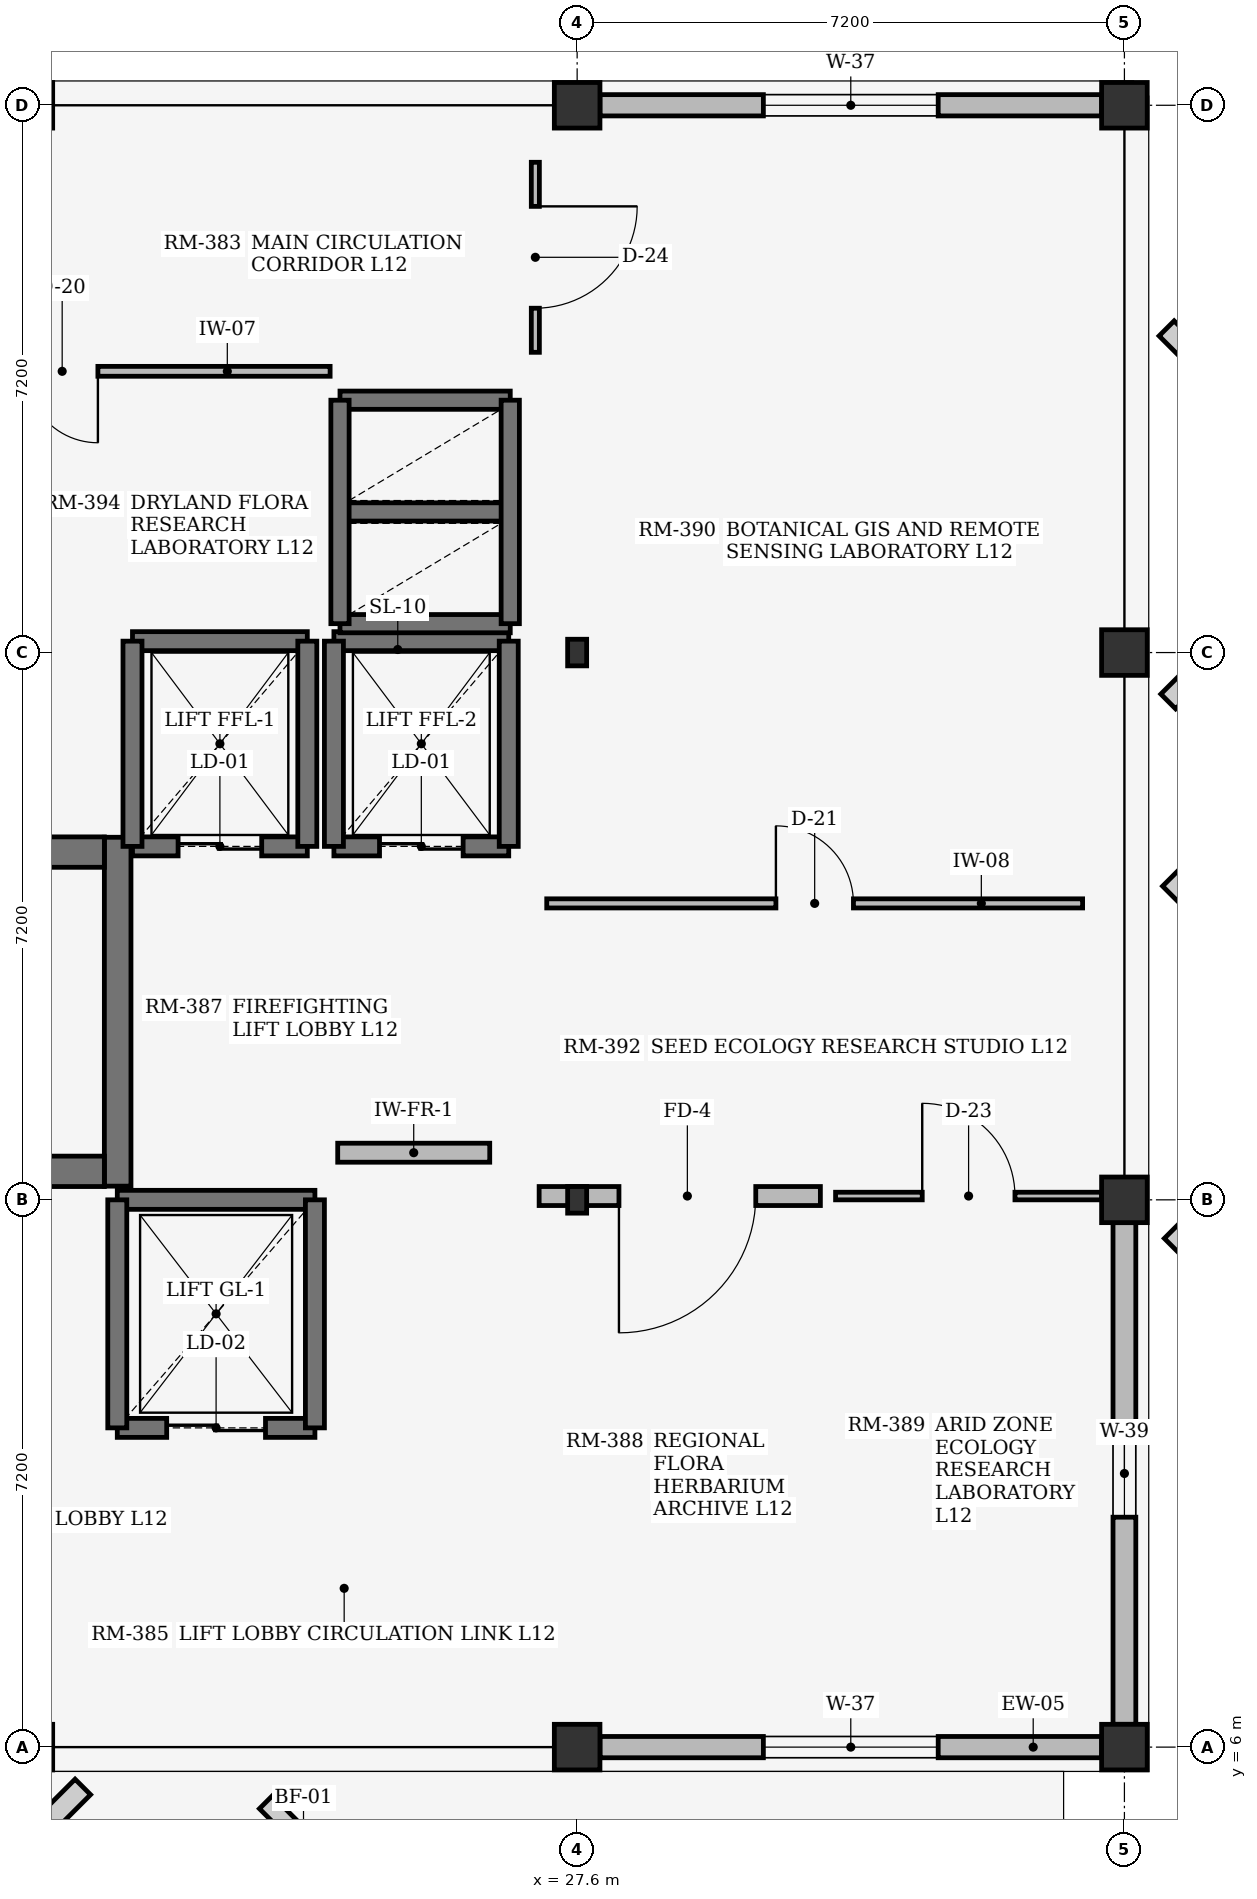
"""IFC4 building model, lengths in metres.
Left out: names, types, materials, properties, quantities, classifications, styles, units other than length and angle.
Written with IfcOpenShell. Run it as: python <this file> out.ifc"""

import sys

from ifc_helpers import new_model, si_unit, direction, frame, frame_2d, origin, origin_2d, place, context, subcontext, project, spatial, rectangle, i_section, extrude, element, fill, save


model = new_model("IFC4")
c1 = context("Model", 3, precision=1e-05, world=origin(), true_north=direction((0.0, 1.0)))
c2 = subcontext(c1, "Body", "Model", "MODEL_VIEW")
j1 = project(units=[si_unit("LENGTHUNIT", "METRE"), si_unit("PLANEANGLEUNIT", "RADIAN")], contexts=[c1])
p1 = place(None, origin())
s1 = spatial("IfcSite", under=j1, at=p1, CompositionType="ELEMENT")
p2 = place(p1, origin())
s2 = spatial("IfcBuilding", under=s1, at=p2, CompositionType="ELEMENT")
p3 = place(p2, frame((0.0, 0.0, 48.3)))
s3 = spatial("IfcBuildingStorey", under=s2, at=p3, CompositionType="ELEMENT", Elevation=48.3)
p4 = place(p3, frame((27.6, 6.0, 0.0), z_axis=(0.0, 0.0, 1.0), x_axis=(1.0, 0.0, 0.0)))
e1 = element("IfcColumn", 1, at=p4, inside=s3, PredefinedType="COLUMN", context=c2, shape_type="SweptSolid", body=[
    extrude(rectangle(XDim=0.6, YDim=0.6, at=origin_2d()), origin(), (0.0, 0.0, 1.0), 3.68),
])
for number, where, z_axis, x_axis in (
    (2, (27.6, 13.2, 0.0), (0.0, 0.0, 1.0), (1.0, 0.0, 0.0)),
    (3, (27.6, 20.4, 0.0), (0.0, 0.0, 1.0), (1.0, 0.0, 0.0)),
):
    element("IfcColumn", number, at=place(p3, frame(where, z_axis=z_axis, x_axis=x_axis)), inside=s3, PredefinedType="COLUMN", context=c2, shape_type="SweptSolid", body=[
        extrude(i_section(OverallWidth=0.25, OverallDepth=0.35, WebThickness=0.01, FlangeThickness=0.012, at=origin_2d()), origin(), (0.0, 0.0, 1.0), 3.68),
    ])
for number, where, z_axis, x_axis in (
    (4, (27.6, 27.6, 0.0), (0.0, 0.0, 1.0), (1.0, 0.0, 0.0)),
    (5, (34.8, 6.0, 0.0), (0.0, 0.0, 1.0), (1.0, 0.0, 0.0)),
    (6, (34.8, 13.2, 0.0), (0.0, 0.0, 1.0), (1.0, 0.0, 0.0)),
    (7, (34.8, 20.4, 0.0), (0.0, 0.0, 1.0), (1.0, 0.0, 0.0)),
    (8, (34.8, 27.6, 0.0), (0.0, 0.0, 1.0), (1.0, 0.0, 0.0)),
):
    element("IfcColumn", number, at=place(p3, frame(where, z_axis=z_axis, x_axis=x_axis)), inside=s3, PredefinedType="COLUMN", context=c2, shape_type="SweptSolid", body=[
        extrude(rectangle(XDim=0.6, YDim=0.6, at=origin_2d()), origin(), (0.0, 0.0, 1.0), 3.68),
    ])
p5 = place(p3, frame((27.9, 6.0, 0.0), z_axis=(0.0, 0.0, 1.0), x_axis=(1.0, 0.0, 0.0)))
e9 = element("IfcWall", 9, at=p5, inside=s3, PredefinedType="STANDARD", context=c2, shape_type="SweptSolid", body=[
    extrude(rectangle(XDim=6.6, YDim=0.28, at=frame_2d((3.3, 0.0))), origin(), (0.0, 0.0, 1.0), 3.26),
])
p6 = place(p5, frame((2.15, 0.0, 0.75)))
e10 = element("IfcOpeningElement", 10, at=p6, cuts=e9, PredefinedType="OPENING", context=c2, shape_type="SweptSolid", body=[
    extrude(rectangle(XDim=2.3, YDim=1.35, at=frame_2d((1.15, 0.675))), frame((0.0, 0.15, 0.0), z_axis=(0.0, -1.0, 0.0), x_axis=(1.0, 0.0, 0.0)), (0.0, 0.0, 1.0), 0.3),
])
p7 = place(p3, frame((27.9, 27.6, 0.0), z_axis=(0.0, 0.0, 1.0), x_axis=(1.0, 0.0, 0.0)))
e11 = element("IfcWall", 11, at=p7, inside=s3, PredefinedType="STANDARD", context=c2, shape_type="SweptSolid", body=[
    extrude(rectangle(XDim=6.6, YDim=0.28, at=frame_2d((3.3, 0.0))), origin(), (0.0, 0.0, 1.0), 3.26),
])
p8 = place(p7, frame((2.15, 0.0, 0.75)))
e12 = element("IfcOpeningElement", 12, at=p8, cuts=e11, PredefinedType="OPENING", context=c2, shape_type="SweptSolid", body=[
    extrude(rectangle(XDim=2.3, YDim=1.35, at=frame_2d((1.15, 0.675))), frame((0.0, 0.15, 0.0), z_axis=(0.0, -1.0, 0.0), x_axis=(1.0, 0.0, 0.0)), (0.0, 0.0, 1.0), 0.3),
])
p9 = place(p3, frame((34.8, 6.3, 0.0), z_axis=(0.0, 0.0, 1.0), x_axis=(0.0, 1.0, 0.0)))
e13 = element("IfcWall", 13, at=p9, inside=s3, PredefinedType="STANDARD", context=c2, shape_type="SweptSolid", body=[
    extrude(rectangle(XDim=6.6, YDim=0.3, at=frame_2d((3.3, 0.0))), origin(), (0.0, 0.0, 1.0), 3.26),
])
p10 = place(p9, frame((2.725, 0.0, 0.75)))
e14 = element("IfcOpeningElement", 14, at=p10, cuts=e13, PredefinedType="OPENING", context=c2, shape_type="SweptSolid", body=[
    extrude(rectangle(XDim=1.15, YDim=1.5, at=frame_2d((0.575, 0.75))), frame((0.0, 0.16, 0.0), z_axis=(0.0, -1.0, 0.0), x_axis=(1.0, 0.0, 0.0)), (0.0, 0.0, 1.0), 0.32),
])
p11 = place(p3, frame((21.555, 13.38, 0.0), z_axis=(0.0, 0.0, 1.0), x_axis=(0.0, 1.0, 0.0)))
e15 = element("IfcWall", 15, at=p11, inside=s3, PredefinedType="SHEAR", context=c2, shape_type="SweptSolid", body=[
    extrude(rectangle(XDim=4.59, YDim=0.35, at=frame_2d((2.295, 0.0))), origin(), (0.0, 0.0, 1.0), 3.68),
])
for number, where, z_axis, x_axis in (
    (16, (13.4, 13.575, 0.0), (0.0, 0.0, 1.0), (1.0, 0.0, 0.0)),
    (17, (13.4, 17.775, 0.0), (0.0, 0.0, 1.0), (1.0, 0.0, 0.0)),
):
    element("IfcWall", number, at=place(p3, frame(where, z_axis=z_axis, x_axis=x_axis)), inside=s3, PredefinedType="SHEAR", context=c2, shape_type="SweptSolid", body=[
        extrude(rectangle(XDim=7.98, YDim=0.4, at=frame_2d((3.99, 0.0))), origin(), (0.0, 0.0, 1.0), 3.68),
    ])
p12 = place(p3, frame((21.75, 17.85, 0.0), z_axis=(0.0, 0.0, 1.0), x_axis=(1.0, 0.0, 0.0)))
e18 = element("IfcWall", 18, at=p12, inside=s3, PredefinedType="SHEAR", context=c2, shape_type="SweptSolid", body=[
    extrude(rectangle(XDim=2.3, YDim=0.25, at=frame_2d((1.15, 0.0))), origin(), (0.0, 0.0, 1.0), 3.68),
])
p13 = place(p12, frame((0.6, 0.0, 0.0)))
e19 = element("IfcOpeningElement", 19, at=p13, cuts=e18, PredefinedType="OPENING", context=c2, shape_type="SweptSolid", body=[
    extrude(rectangle(XDim=1.1, YDim=2.2, at=frame_2d((0.55, 1.1))), frame((0.0, 0.135, 0.0), z_axis=(0.0, -1.0, 0.0), x_axis=(1.0, 0.0, 0.0)), (0.0, 0.0, 1.0), 0.27),
])
p14 = place(p3, frame((21.75, 20.55, 0.0), z_axis=(0.0, 0.0, 1.0), x_axis=(1.0, 0.0, 0.0)))
e20 = element("IfcWall", 20, at=p14, inside=s3, PredefinedType="SHEAR", context=c2, shape_type="SweptSolid", body=[
    extrude(rectangle(XDim=2.3, YDim=0.25, at=frame_2d((1.15, 0.0))), origin(), (0.0, 0.0, 1.0), 3.68),
])
for number, where, z_axis, x_axis in (
    (21, (21.75, 17.85, 0.0), (0.0, 0.0, 1.0), (0.0, 1.0, 0.0)),
    (22, (24.05, 17.85, 0.0), (0.0, 0.0, 1.0), (0.0, 1.0, 0.0)),
):
    element("IfcWall", number, at=place(p3, frame(where, z_axis=z_axis, x_axis=x_axis)), inside=s3, PredefinedType="SHEAR", context=c2, shape_type="SweptSolid", body=[
        extrude(rectangle(XDim=2.7, YDim=0.25, at=frame_2d((1.35, 0.0))), origin(), (0.0, 0.0, 1.0), 3.68),
    ])
p15 = place(p3, frame((24.4, 17.85, 0.0), z_axis=(0.0, 0.0, 1.0), x_axis=(1.0, 0.0, 0.0)))
e23 = element("IfcWall", 23, at=p15, inside=s3, PredefinedType="SHEAR", context=c2, shape_type="SweptSolid", body=[
    extrude(rectangle(XDim=2.3, YDim=0.25, at=frame_2d((1.15, 0.0))), origin(), (0.0, 0.0, 1.0), 3.68),
])
p16 = place(p15, frame((0.6, 0.0, 0.0)))
e24 = element("IfcOpeningElement", 24, at=p16, cuts=e23, PredefinedType="OPENING", context=c2, shape_type="SweptSolid", body=[
    extrude(rectangle(XDim=1.1, YDim=2.2, at=frame_2d((0.55, 1.1))), frame((0.0, 0.135, 0.0), z_axis=(0.0, -1.0, 0.0), x_axis=(1.0, 0.0, 0.0)), (0.0, 0.0, 1.0), 0.27),
])
p17 = place(p3, frame((24.4, 20.55, 0.0), z_axis=(0.0, 0.0, 1.0), x_axis=(1.0, 0.0, 0.0)))
e25 = element("IfcWall", 25, at=p17, inside=s3, PredefinedType="SHEAR", context=c2, shape_type="SweptSolid", body=[
    extrude(rectangle(XDim=2.3, YDim=0.25, at=frame_2d((1.15, 0.0))), origin(), (0.0, 0.0, 1.0), 3.68),
])
for number, where, z_axis, x_axis in (
    (26, (24.4, 17.85, 0.0), (0.0, 0.0, 1.0), (0.0, 1.0, 0.0)),
    (27, (26.7, 17.85, 0.0), (0.0, 0.0, 1.0), (0.0, 1.0, 0.0)),
):
    element("IfcWall", number, at=place(p3, frame(where, z_axis=z_axis, x_axis=x_axis)), inside=s3, PredefinedType="SHEAR", context=c2, shape_type="SweptSolid", body=[
        extrude(rectangle(XDim=2.7, YDim=0.25, at=frame_2d((1.35, 0.0))), origin(), (0.0, 0.0, 1.0), 3.68),
    ])
p18 = place(p3, frame((21.55, 10.2, 0.0), z_axis=(0.0, 0.0, 1.0), x_axis=(1.0, 0.0, 0.0)))
e28 = element("IfcWall", 28, at=p18, inside=s3, PredefinedType="SHEAR", context=c2, shape_type="SweptSolid", body=[
    extrude(rectangle(XDim=2.6, YDim=0.25, at=frame_2d((1.3, 0.0))), origin(), (0.0, 0.0, 1.0), 3.68),
])
p19 = place(p18, frame((0.65, 0.0, 0.0)))
e29 = element("IfcOpeningElement", 29, at=p19, cuts=e28, PredefinedType="OPENING", context=c2, shape_type="SweptSolid", body=[
    extrude(rectangle(XDim=1.3, YDim=2.25, at=frame_2d((0.65, 1.125))), frame((0.0, 0.135, 0.0), z_axis=(0.0, -1.0, 0.0), x_axis=(1.0, 0.0, 0.0)), (0.0, 0.0, 1.0), 0.27),
])
p20 = place(p3, frame((21.55, 13.2, 0.0), z_axis=(0.0, 0.0, 1.0), x_axis=(1.0, 0.0, 0.0)))
e30 = element("IfcWall", 30, at=p20, inside=s3, PredefinedType="SHEAR", context=c2, shape_type="SweptSolid", body=[
    extrude(rectangle(XDim=2.6, YDim=0.25, at=frame_2d((1.3, 0.0))), origin(), (0.0, 0.0, 1.0), 3.68),
])
for number, where, z_axis, x_axis in (
    (31, (21.55, 10.2, 0.0), (0.0, 0.0, 1.0), (0.0, 1.0, 0.0)),
    (32, (24.15, 10.2, 0.0), (0.0, 0.0, 1.0), (0.0, 1.0, 0.0)),
):
    element("IfcWall", number, at=place(p3, frame(where, z_axis=z_axis, x_axis=x_axis)), inside=s3, PredefinedType="SHEAR", context=c2, shape_type="SweptSolid", body=[
        extrude(rectangle(XDim=3.0, YDim=0.25, at=frame_2d((1.5, 0.0))), origin(), (0.0, 0.0, 1.0), 3.68),
    ])
for number, where, z_axis, x_axis in (
    (33, (24.48, 20.78, 0.0), (0.0, 0.0, 1.0), (1.0, 0.0, 0.0)),
    (34, (24.48, 22.25, 0.0), (0.0, 0.0, 1.0), (1.0, 0.0, 0.0)),
    (35, (24.48, 23.72, 0.0), (0.0, 0.0, 1.0), (1.0, 0.0, 0.0)),
):
    element("IfcWall", number, at=place(p3, frame(where, z_axis=z_axis, x_axis=x_axis)), inside=s3, PredefinedType="SHEAR", context=c2, shape_type="SweptSolid", body=[
        extrude(rectangle(XDim=2.24, YDim=0.24, at=frame_2d((1.12, 0.0))), origin(), (0.0, 0.0, 1.0), 3.68),
    ])
for number, where, z_axis, x_axis in (
    (36, (24.48, 20.78, 0.0), (0.0, 0.0, 1.0), (0.0, 1.0, 0.0)),
    (37, (26.72, 20.78, 0.0), (0.0, 0.0, 1.0), (0.0, 1.0, 0.0)),
):
    element("IfcWall", number, at=place(p3, frame(where, z_axis=z_axis, x_axis=x_axis)), inside=s3, PredefinedType="SHEAR", context=c2, shape_type="SweptSolid", body=[
        extrude(rectangle(XDim=2.94, YDim=0.24, at=frame_2d((1.47, 0.0))), origin(), (0.0, 0.0, 1.0), 3.68),
    ])
p21 = place(p3, frame((24.45, 13.82, 0.0), z_axis=(0.0, 0.0, 1.0), x_axis=(1.0, 0.0, 0.0)))
e38 = element("IfcWall", 38, at=p21, inside=s3, PredefinedType="SOLIDWALL", context=c2, shape_type="SweptSolid", body=[
    extrude(rectangle(XDim=2.0, YDim=0.25, at=frame_2d((1.0, 0.0))), origin(), (0.0, 0.0, 1.0), 3.66),
])
p22 = place(p3, frame((17.3, 24.1, 0.0), z_axis=(0.0, 0.0, 1.0), x_axis=(1.0, 0.0, 0.0)))
e39 = element("IfcWall", 39, at=p22, inside=s3, PredefinedType="PARTITIONING", context=c2, shape_type="SweptSolid", body=[
    extrude(rectangle(XDim=7.05, YDim=0.13, at=frame_2d((3.525, 0.0))), origin(), (0.0, 0.0, 1.0), 3.66),
])
p23 = place(p22, frame((3.055, 0.0, 0.0)))
e40 = element("IfcOpeningElement", 40, at=p23, cuts=e39, PredefinedType="OPENING", context=c2, shape_type="SweptSolid", body=[
    extrude(rectangle(XDim=0.94, YDim=2.18, at=frame_2d((0.47, 1.09))), frame((0.0, 0.075, 0.0), z_axis=(0.0, -1.0, 0.0), x_axis=(1.0, 0.0, 0.0)), (0.0, 0.0, 1.0), 0.15),
])
p24 = place(p3, frame((27.2, 17.1, 0.0), z_axis=(0.0, 0.0, 1.0), x_axis=(1.0, 0.0, 0.0)))
e41 = element("IfcWall", 41, at=p24, inside=s3, PredefinedType="PARTITIONING", context=c2, shape_type="SweptSolid", body=[
    extrude(rectangle(XDim=7.05, YDim=0.12, at=frame_2d((3.525, 0.0))), origin(), (0.0, 0.0, 1.0), 3.66),
])
p25 = place(p24, frame((3.015, 0.0, 0.0)))
e42 = element("IfcOpeningElement", 42, at=p25, cuts=e41, PredefinedType="OPENING", context=c2, shape_type="SweptSolid", body=[
    extrude(rectangle(XDim=1.02, YDim=2.18, at=frame_2d((0.51, 1.09))), frame((0.0, 0.07, 0.0), z_axis=(0.0, -1.0, 0.0), x_axis=(1.0, 0.0, 0.0)), (0.0, 0.0, 1.0), 0.14),
])
p26 = place(p3, frame((27.1, 13.25, 0.0), z_axis=(0.0, 0.0, 1.0), x_axis=(1.0, 0.0, 0.0)))
e43 = element("IfcWall", 43, at=p26, inside=s3, PredefinedType="SOLIDWALL", context=c2, shape_type="SweptSolid", body=[
    extrude(rectangle(XDim=3.7, YDim=0.25, at=frame_2d((1.85, 0.0))), origin(), (0.0, 0.0, 1.0), 3.27),
])
p27 = place(p26, frame((1.05, 0.0, 0.0)))
e44 = element("IfcOpeningElement", 44, at=p27, cuts=e43, PredefinedType="OPENING", context=c2, shape_type="SweptSolid", body=[
    extrude(rectangle(XDim=1.8, YDim=2.25, at=frame_2d((0.9, 1.125))), frame((0.0, 0.135, 0.0), z_axis=(0.0, -1.0, 0.0), x_axis=(1.0, 0.0, 0.0)), (0.0, 0.0, 1.0), 0.27),
])
p28 = place(p3, frame((31.0, 13.25, 0.0), z_axis=(0.0, 0.0, 1.0), x_axis=(1.0, 0.0, 0.0)))
e45 = element("IfcWall", 45, at=p28, inside=s3, PredefinedType="PARTITIONING", context=c2, shape_type="SweptSolid", body=[
    extrude(rectangle(XDim=3.5, YDim=0.1, at=frame_2d((1.75, 0.0))), origin(), (0.0, 0.0, 1.0), 3.27),
])
p29 = place(p28, frame((1.14, 0.0, 0.0)))
e46 = element("IfcOpeningElement", 46, at=p29, cuts=e45, PredefinedType="OPENING", context=c2, shape_type="SweptSolid", body=[
    extrude(rectangle(XDim=1.22, YDim=2.22, at=frame_2d((0.61, 1.11))), frame((0.0, 0.06, 0.0), z_axis=(0.0, -1.0, 0.0), x_axis=(1.0, 0.0, 0.0)), (0.0, 0.0, 1.0), 0.12),
])
p30 = place(p3, frame((27.05, 24.35, 0.0), z_axis=(0.0, 0.0, 1.0), x_axis=(0.0, 1.0, 0.0)))
e47 = element("IfcWall", 47, at=p30, inside=s3, PredefinedType="PARTITIONING", context=c2, shape_type="SweptSolid", body=[
    extrude(rectangle(XDim=2.5, YDim=0.106, at=frame_2d((1.25, 0.0))), origin(), (0.0, 0.0, 1.0), 3.66),
])
p31 = place(p30, frame((0.58, 0.0, 0.0)))
e48 = element("IfcOpeningElement", 48, at=p31, cuts=e47, PredefinedType="OPENING", context=c2, shape_type="SweptSolid", body=[
    extrude(rectangle(XDim=1.34, YDim=2.22, at=frame_2d((0.67, 1.11))), frame((0.0, 0.063, 0.0), z_axis=(0.0, -1.0, 0.0), x_axis=(1.0, 0.0, 0.0)), (0.0, 0.0, 1.0), 0.126),
])
p32 = place(p6, origin())
e49 = element("IfcWindow", 49, at=p32, inside=s3, PartitioningType="SINGLE_PANEL", PredefinedType="WINDOW", context=c2, shape_type="SweptSolid", body=[
    extrude(rectangle(XDim=2.3, YDim=1.35, at=frame_2d((1.15, 0.675))), frame((0.0, 0.03, 0.0), z_axis=(0.0, -1.0, 0.0), x_axis=(1.0, 0.0, 0.0)), (0.0, 0.0, 1.0), 0.06),
])
fill(e10, e49)
p33 = place(p8, origin())
e50 = element("IfcWindow", 50, at=p33, inside=s3, PartitioningType="SINGLE_PANEL", PredefinedType="WINDOW", context=c2, shape_type="SweptSolid", body=[
    extrude(rectangle(XDim=2.3, YDim=1.35, at=frame_2d((1.15, 0.675))), frame((0.0, 0.03, 0.0), z_axis=(0.0, -1.0, 0.0), x_axis=(1.0, 0.0, 0.0)), (0.0, 0.0, 1.0), 0.06),
])
fill(e12, e50)
p34 = place(p10, origin())
e51 = element("IfcWindow", 51, at=p34, inside=s3, PartitioningType="SINGLE_PANEL", PredefinedType="WINDOW", context=c2, shape_type="SweptSolid", body=[
    extrude(rectangle(XDim=1.15, YDim=1.5, at=frame_2d((0.575, 0.75))), frame((0.0, 0.03, 0.0), z_axis=(0.0, -1.0, 0.0), x_axis=(1.0, 0.0, 0.0)), (0.0, 0.0, 1.0), 0.06),
])
fill(e14, e51)
p35 = place(p13, origin())
e52 = element("IfcDoor", 52, at=p35, inside=s3, OperationType="DOUBLE_DOOR_SLIDING", PredefinedType="DOOR", context=c2, shape_type="SweptSolid", body=[
    extrude(rectangle(XDim=1.1, YDim=2.2, at=frame_2d((0.55, 1.1))), frame((0.0, 0.025, 0.0), z_axis=(0.0, -1.0, 0.0), x_axis=(1.0, 0.0, 0.0)), (0.0, 0.0, 1.0), 0.05),
])
fill(e19, e52)
p36 = place(p16, origin())
e53 = element("IfcDoor", 53, at=p36, inside=s3, OperationType="DOUBLE_DOOR_SLIDING", PredefinedType="DOOR", context=c2, shape_type="SweptSolid", body=[
    extrude(rectangle(XDim=1.1, YDim=2.2, at=frame_2d((0.55, 1.1))), frame((0.0, 0.025, 0.0), z_axis=(0.0, -1.0, 0.0), x_axis=(1.0, 0.0, 0.0)), (0.0, 0.0, 1.0), 0.05),
])
fill(e24, e53)
p37 = place(p19, origin())
e54 = element("IfcDoor", 54, at=p37, inside=s3, OperationType="DOUBLE_DOOR_SLIDING", PredefinedType="DOOR", context=c2, shape_type="SweptSolid", body=[
    extrude(rectangle(XDim=1.3, YDim=2.25, at=frame_2d((0.65, 1.125))), frame((0.0, 0.025, 0.0), z_axis=(0.0, -1.0, 0.0), x_axis=(1.0, 0.0, 0.0)), (0.0, 0.0, 1.0), 0.05),
])
fill(e29, e54)
p38 = place(p23, origin())
e55 = element("IfcDoor", 55, at=p38, inside=s3, OperationType="SINGLE_SWING_RIGHT", PredefinedType="DOOR", context=c2, shape_type="SweptSolid", body=[
    extrude(rectangle(XDim=0.94, YDim=2.18, at=frame_2d((0.47, 1.09))), frame((0.0, 0.025, 0.0), z_axis=(0.0, -1.0, 0.0), x_axis=(1.0, 0.0, 0.0)), (0.0, 0.0, 1.0), 0.05),
])
fill(e40, e55)
p39 = place(p25, origin())
e56 = element("IfcDoor", 56, at=p39, inside=s3, OperationType="SINGLE_SWING_LEFT", PredefinedType="DOOR", context=c2, shape_type="SweptSolid", body=[
    extrude(rectangle(XDim=1.02, YDim=2.18, at=frame_2d((0.51, 1.09))), frame((0.0, 0.025, 0.0), z_axis=(0.0, -1.0, 0.0), x_axis=(1.0, 0.0, 0.0)), (0.0, 0.0, 1.0), 0.05),
])
fill(e42, e56)
p40 = place(p27, frame((1.8, 0.0, 0.0), z_axis=(0.0, 0.0, 1.0), x_axis=(-1.0, 0.0, 0.0)))
e57 = element("IfcDoor", 57, at=p40, inside=s3, OperationType="DOUBLE_DOOR_SINGLE_SWING", PredefinedType="DOOR", context=c2, shape_type="SweptSolid", body=[
    extrude(rectangle(XDim=1.8, YDim=2.25, at=frame_2d((0.9, 1.125))), frame((0.0, 0.025, 0.0), z_axis=(0.0, -1.0, 0.0), x_axis=(1.0, 0.0, 0.0)), (0.0, 0.0, 1.0), 0.05),
])
fill(e44, e57)
p41 = place(p29, origin())
e58 = element("IfcDoor", 58, at=p41, inside=s3, OperationType="SINGLE_SWING_LEFT", PredefinedType="DOOR", context=c2, shape_type="SweptSolid", body=[
    extrude(rectangle(XDim=1.22, YDim=2.22, at=frame_2d((0.61, 1.11))), frame((0.0, 0.025, 0.0), z_axis=(0.0, -1.0, 0.0), x_axis=(1.0, 0.0, 0.0)), (0.0, 0.0, 1.0), 0.05),
])
fill(e46, e58)
p42 = place(p31, origin())
e59 = element("IfcDoor", 59, at=p42, inside=s3, OperationType="SINGLE_SWING_RIGHT", PredefinedType="DOOR", context=c2, shape_type="SweptSolid", body=[
    extrude(rectangle(XDim=1.34, YDim=2.22, at=frame_2d((0.67, 1.11))), frame((0.0, 0.025, 0.0), z_axis=(0.0, -1.0, 0.0), x_axis=(1.0, 0.0, 0.0)), (0.0, 0.0, 1.0), 0.05),
])
fill(e48, e59)
save(model, sys.argv[1])
